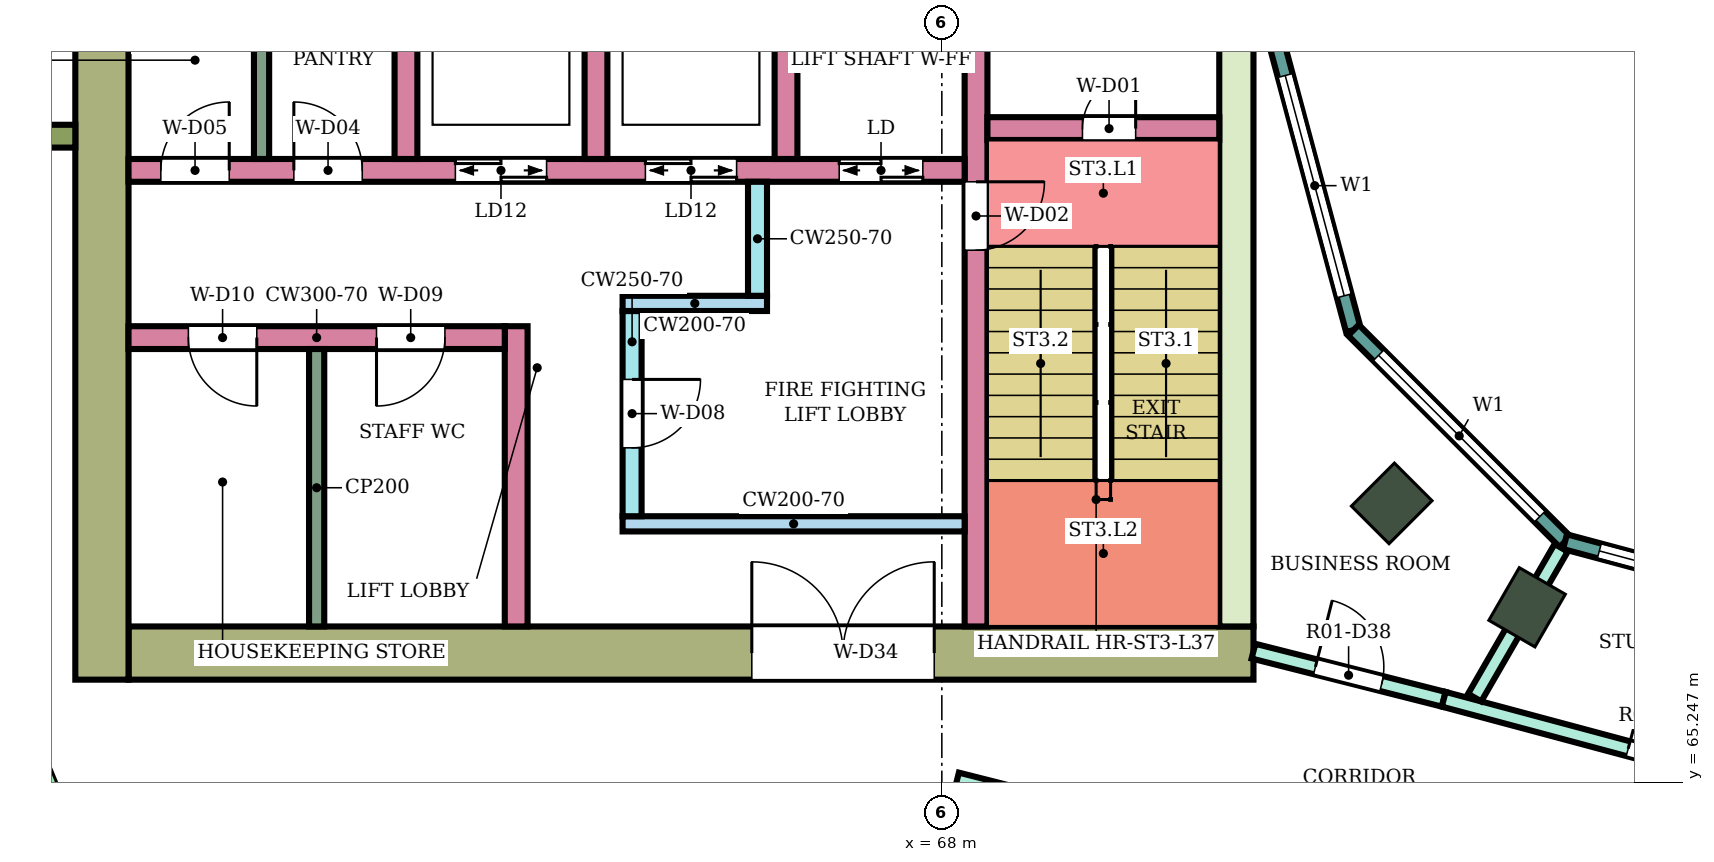
"""IFC4 building model, lengths in metres.
Left out: names, types, materials, properties, quantities, classifications, styles, units other than length and angle.
Written with IfcOpenShell. Run it as: python <this file> out.ifc"""

import sys

from ifc_helpers import new_model, si_unit, direction, frame, frame_2d, origin, origin_2d, place, context, subcontext, project, spatial, rectangle, extrude, element, fill, save


model = new_model("IFC4")
c1 = context("Model", 3, precision=1e-05, world=origin(), true_north=direction((0.0, 1.0)))
c2 = subcontext(c1, "Body", "Model", "MODEL_VIEW")
j1 = project(units=[si_unit("LENGTHUNIT", "METRE"), si_unit("PLANEANGLEUNIT", "RADIAN")], contexts=[c1])
p1 = place(None, origin())
s1 = spatial("IfcSite", under=j1, at=p1, CompositionType="ELEMENT")
p2 = place(p1, origin())
s2 = spatial("IfcBuilding", under=s1, at=p2, CompositionType="ELEMENT")
p3 = place(p2, frame((0.0, 0.0, 161.8)))
s3 = spatial("IfcBuildingStorey", under=s2, at=p3, CompositionType="ELEMENT", Elevation=161.8)
for number, where, z_axis, x_axis in (
    (1, (73.919, 68.919, 0.0), (0.0, 0.0, 1.0), (-0.707, -0.707, 0.0)),
    (2, (75.7, 67.552, 0.0), (0.0, 0.0, 1.0), (-0.5, -0.866, 0.0)),
):
    element("IfcColumn", number, at=place(p3, frame(where, z_axis=z_axis, x_axis=x_axis)), inside=s3, PredefinedType="COLUMN", context=c2, shape_type="SweptSolid", body=[
        extrude(rectangle(XDim=0.8, YDim=0.7, at=origin_2d()), origin(), (0.0, 0.0, 1.0), 4.1),
    ])
p4 = place(p3, frame((72.1, 66.95, 0.0), z_axis=(0.0, 0.0, 1.0), x_axis=(-1.0, 0.0, 0.0)))
e3 = element("IfcWall", 3, at=p4, inside=s3, PredefinedType="SHEAR", context=c2, shape_type="SweptSolid", body=[
    extrude(rectangle(XDim=14.8, YDim=0.7, at=frame_2d((7.4, 0.0))), origin(), (0.0, 0.0, 1.0), 3.78),
])
p5 = place(p4, frame((4.2, 0.0, 0.0)))
e4 = element("IfcOpeningElement", 4, at=p5, cuts=e3, PredefinedType="OPENING", context=c2, shape_type="SweptSolid", body=[
    extrude(rectangle(XDim=2.4, YDim=2.4, at=frame_2d((1.2, 1.2))), frame((0.0, 0.36, 0.0), z_axis=(0.0, -1.0, 0.0), x_axis=(1.0, 0.0, 0.0)), (0.0, 0.0, 1.0), 0.72),
])
p6 = place(p3, frame((71.875, 75.0, 0.0), z_axis=(0.0, 0.0, 1.0), x_axis=(0.0, -1.0, 0.0)))
e5 = element("IfcWall", 5, at=p6, inside=s3, PredefinedType="SHEAR", context=c2, shape_type="SweptSolid", body=[
    extrude(rectangle(XDim=7.7, YDim=0.45, at=frame_2d((3.85, 0.0))), origin(), (0.0, 0.0, 1.0), 3.78),
])
p7 = place(p3, frame((56.95, 83.4, 0.0), z_axis=(0.0, 0.0, 1.0), x_axis=(0.0, -1.0, 0.0)))
e6 = element("IfcWall", 6, at=p7, inside=s3, PredefinedType="SHEAR", context=c2, shape_type="SweptSolid", body=[
    extrude(rectangle(XDim=16.8, YDim=0.7, at=frame_2d((8.4, 0.0))), origin(), (0.0, 0.0, 1.0), 3.78),
])
p8 = place(p3, frame((68.45, 75.0, 0.0), z_axis=(0.0, 0.0, 1.0), x_axis=(0.0, -1.0, 0.0)))
e7 = element("IfcWall", 7, at=p8, inside=s3, PredefinedType="SHEAR", context=c2, shape_type="SweptSolid", body=[
    extrude(rectangle(XDim=7.7, YDim=0.3, at=frame_2d((3.85, 0.0))), origin(), (0.0, 0.0, 1.0), 3.78),
])
p9 = place(p8, frame((1.85, 0.0, 0.0)))
e8 = element("IfcOpeningElement", 8, at=p9, cuts=e7, PredefinedType="OPENING", context=c2, shape_type="SweptSolid", body=[
    extrude(rectangle(XDim=0.9, YDim=2.1, at=frame_2d((0.45, 1.05))), frame((0.0, 0.16, 0.0), z_axis=(0.0, -1.0, 0.0), x_axis=(1.0, 0.0, 0.0)), (0.0, 0.0, 1.0), 0.32),
])
p10 = place(p3, frame((71.65, 73.85, 0.0), z_axis=(0.0, 0.0, 1.0), x_axis=(-1.0, 0.0, 0.0)))
e9 = element("IfcWall", 9, at=p10, inside=s3, PredefinedType="SHEAR", context=c2, shape_type="SweptSolid", body=[
    extrude(rectangle(XDim=3.05, YDim=0.3, at=frame_2d((1.525, 0.0))), origin(), (0.0, 0.0, 1.0), 3.78),
])
p11 = place(p10, frame((1.1, 0.0, 0.0)))
e10 = element("IfcOpeningElement", 10, at=p11, cuts=e9, PredefinedType="OPENING", context=c2, shape_type="SweptSolid", body=[
    extrude(rectangle(XDim=0.7, YDim=2.0, at=frame_2d((0.35, 1.0))), frame((0.0, 0.16, 0.0), z_axis=(0.0, -1.0, 0.0), x_axis=(1.0, 0.0, 0.0)), (0.0, 0.0, 1.0), 0.32),
])
p12 = place(p3, frame((68.3, 73.3, 0.0), z_axis=(0.0, 0.0, 1.0), x_axis=(-1.0, 0.0, 0.0)))
e11 = element("IfcWall", 11, at=p12, inside=s3, PredefinedType="SHEAR", context=c2, shape_type="SweptSolid", body=[
    extrude(rectangle(XDim=11.0, YDim=0.3, at=frame_2d((5.5, 0.0))), origin(), (0.0, 0.0, 1.0), 3.78),
])
p13 = place(p12, frame((0.55, 0.0, 0.0)))
e12 = element("IfcOpeningElement", 12, at=p13, cuts=e11, PredefinedType="OPENING", context=c2, shape_type="SweptSolid", body=[
    extrude(rectangle(XDim=1.1, YDim=2.1, at=frame_2d((0.55, 1.05))), frame((0.0, 0.16, 0.0), z_axis=(0.0, -1.0, 0.0), x_axis=(1.0, 0.0, 0.0)), (0.0, 0.0, 1.0), 0.32),
])
p14 = place(p12, frame((3.0, 0.0, 0.0)))
e13 = element("IfcOpeningElement", 13, at=p14, cuts=e11, PredefinedType="OPENING", context=c2, shape_type="SweptSolid", body=[
    extrude(rectangle(XDim=1.2, YDim=2.1, at=frame_2d((0.6, 1.05))), frame((0.0, 0.16, 0.0), z_axis=(0.0, -1.0, 0.0), x_axis=(1.0, 0.0, 0.0)), (0.0, 0.0, 1.0), 0.32),
])
p15 = place(p12, frame((5.5, 0.0, 0.0)))
e14 = element("IfcOpeningElement", 14, at=p15, cuts=e11, PredefinedType="OPENING", context=c2, shape_type="SweptSolid", body=[
    extrude(rectangle(XDim=1.2, YDim=2.1, at=frame_2d((0.6, 1.05))), frame((0.0, 0.16, 0.0), z_axis=(0.0, -1.0, 0.0), x_axis=(1.0, 0.0, 0.0)), (0.0, 0.0, 1.0), 0.32),
])
p16 = place(p12, frame((7.925, 0.0, 0.0)))
e15 = element("IfcOpeningElement", 15, at=p16, cuts=e11, PredefinedType="OPENING", context=c2, shape_type="SweptSolid", body=[
    extrude(rectangle(XDim=0.9, YDim=2.1, at=frame_2d((0.45, 1.05))), frame((0.0, 0.16, 0.0), z_axis=(0.0, -1.0, 0.0), x_axis=(1.0, 0.0, 0.0)), (0.0, 0.0, 1.0), 0.32),
])
p17 = place(p12, frame((9.675, 0.0, 0.0)))
e16 = element("IfcOpeningElement", 16, at=p17, cuts=e11, PredefinedType="OPENING", context=c2, shape_type="SweptSolid", body=[
    extrude(rectangle(XDim=0.9, YDim=2.1, at=frame_2d((0.45, 1.05))), frame((0.0, 0.16, 0.0), z_axis=(0.0, -1.0, 0.0), x_axis=(1.0, 0.0, 0.0)), (0.0, 0.0, 1.0), 0.32),
])
for number, where, z_axis, x_axis in (
    (17, (65.95, 76.0, 0.0), (0.0, 0.0, 1.0), (0.0, -1.0, 0.0)),
    (18, (63.45, 76.0, 0.0), (0.0, 0.0, 1.0), (0.0, -1.0, 0.0)),
    (19, (60.95, 76.0, 0.0), (0.0, 0.0, 1.0), (0.0, -1.0, 0.0)),
):
    element("IfcWall", number, at=place(p3, frame(where, z_axis=z_axis, x_axis=x_axis)), inside=s3, PredefinedType="SHEAR", context=c2, shape_type="SweptSolid", body=[
        extrude(rectangle(XDim=2.55, YDim=0.3, at=frame_2d((1.275, 0.0))), origin(), (0.0, 0.0, 1.0), 3.78),
    ])
p18 = place(p3, frame((68.3, 68.65, 0.0), z_axis=(0.0, 0.0, 1.0), x_axis=(-1.0, 0.0, 0.0)))
e20 = element("IfcWall", 20, at=p18, inside=s3, PredefinedType="SHEAR", context=c2, shape_type="SweptSolid", body=[
    extrude(rectangle(XDim=4.5, YDim=0.2, at=frame_2d((2.25, 0.0))), origin(), (0.0, 0.0, 1.0), 3.78),
])
p19 = place(p3, frame((63.925, 71.45, 0.0), z_axis=(0.0, 0.0, 1.0), x_axis=(0.0, -1.0, 0.0)))
e21 = element("IfcWall", 21, at=p19, inside=s3, PredefinedType="SHEAR", context=c2, shape_type="SweptSolid", body=[
    extrude(rectangle(XDim=2.7, YDim=0.25, at=frame_2d((1.35, 0.0))), origin(), (0.0, 0.0, 1.0), 3.78),
])
p20 = place(p19, frame((0.9, 0.0, 0.0)))
e22 = element("IfcOpeningElement", 22, at=p20, cuts=e21, PredefinedType="OPENING", context=c2, shape_type="SweptSolid", body=[
    extrude(rectangle(XDim=0.9, YDim=2.1, at=frame_2d((0.45, 1.05))), frame((0.0, 0.135, 0.0), z_axis=(0.0, -1.0, 0.0), x_axis=(1.0, 0.0, 0.0)), (0.0, 0.0, 1.0), 0.27),
])
p21 = place(p3, frame((65.7, 71.55, 0.0), z_axis=(0.0, 0.0, 1.0), x_axis=(-1.0, 0.0, 0.0)))
e23 = element("IfcWall", 23, at=p21, inside=s3, PredefinedType="SHEAR", context=c2, shape_type="SweptSolid", body=[
    extrude(rectangle(XDim=1.9, YDim=0.2, at=frame_2d((0.95, 0.0))), origin(), (0.0, 0.0, 1.0), 3.78),
])
p22 = place(p3, frame((65.575, 73.15, 0.0), z_axis=(0.0, 0.0, 1.0), x_axis=(0.0, -1.0, 0.0)))
e24 = element("IfcWall", 24, at=p22, inside=s3, PredefinedType="SHEAR", context=c2, shape_type="SweptSolid", body=[
    extrude(rectangle(XDim=1.5, YDim=0.25, at=frame_2d((0.75, 0.0))), origin(), (0.0, 0.0, 1.0), 3.78),
])
p23 = place(p3, frame((62.4, 71.25, 0.0), z_axis=(0.0, 0.0, 1.0), x_axis=(0.0, -1.0, 0.0)))
e25 = element("IfcWall", 25, at=p23, inside=s3, PredefinedType="SHEAR", context=c2, shape_type="SweptSolid", body=[
    extrude(rectangle(XDim=3.95, YDim=0.3, at=frame_2d((1.975, 0.0))), origin(), (0.0, 0.0, 1.0), 3.78),
])
p24 = place(p3, frame((62.25, 71.1, 0.0), z_axis=(0.0, 0.0, 1.0), x_axis=(-1.0, 0.0, 0.0)))
e26 = element("IfcWall", 26, at=p24, inside=s3, PredefinedType="SHEAR", context=c2, shape_type="SweptSolid", body=[
    extrude(rectangle(XDim=4.95, YDim=0.3, at=frame_2d((2.475, 0.0))), origin(), (0.0, 0.0, 1.0), 3.78),
])
p25 = place(p24, frame((0.788, 0.0, 0.0)))
e27 = element("IfcOpeningElement", 27, at=p25, cuts=e26, PredefinedType="OPENING", context=c2, shape_type="SweptSolid", body=[
    extrude(rectangle(XDim=0.9, YDim=2.1, at=frame_2d((0.45, 1.05))), frame((0.0, 0.16, 0.0), z_axis=(0.0, -1.0, 0.0), x_axis=(1.0, 0.0, 0.0)), (0.0, 0.0, 1.0), 0.32),
])
p26 = place(p24, frame((3.262, 0.0, 0.0)))
e28 = element("IfcOpeningElement", 28, at=p26, cuts=e26, PredefinedType="OPENING", context=c2, shape_type="SweptSolid", body=[
    extrude(rectangle(XDim=0.9, YDim=2.1, at=frame_2d((0.45, 1.05))), frame((0.0, 0.16, 0.0), z_axis=(0.0, -1.0, 0.0), x_axis=(1.0, 0.0, 0.0)), (0.0, 0.0, 1.0), 0.32),
])
p27 = place(p3, frame((56.6, 73.75, 0.0), z_axis=(0.0, 0.0, 1.0), x_axis=(-1.0, 0.0, 0.0)))
e29 = element("IfcWall", 29, at=p27, inside=s3, PredefinedType="NOTDEFINED", context=c2, shape_type="SweptSolid", body=[
    extrude(rectangle(XDim=2.416, YDim=0.3, at=frame_2d((1.208, 0.0))), origin(), (0.0, 0.0, 1.0), 4.1),
])
p28 = place(p3, frame((72.396, 75.0, 0.0), z_axis=(0.0, 0.0, 1.0), x_axis=(0.258789828301, -0.965933654434, 0.0)))
e30 = element("IfcWall", 30, at=p28, inside=s3, PredefinedType="NOTDEFINED", context=c2, shape_type="SweptSolid", body=[
    extrude(rectangle(XDim=3.936, YDim=0.2, at=frame_2d((1.968, 0.0))), origin(), (0.0, 0.0, 1.0), 4.1),
])
p29 = place(p28, frame((0.468, 0.0, 0.9)))
e31 = element("IfcOpeningElement", 31, at=p29, cuts=e30, PredefinedType="OPENING", context=c2, shape_type="SweptSolid", body=[
    extrude(rectangle(XDim=3.0, YDim=2.3, at=frame_2d((1.5, 1.15))), frame((0.0, 0.11, 0.0), z_axis=(0.0, -1.0, 0.0), x_axis=(1.0, 0.0, 0.0)), (0.0, 0.0, 1.0), 0.22),
])
p30 = place(p3, frame((73.415, 71.198, 0.0), z_axis=(0.0, 0.0, 1.0), x_axis=(0.707106781187, -0.707106781187, 0.0)))
e32 = element("IfcWall", 32, at=p30, inside=s3, PredefinedType="NOTDEFINED", context=c2, shape_type="SweptSolid", body=[
    extrude(rectangle(XDim=3.936, YDim=0.2, at=frame_2d((1.968, 0.0))), origin(), (0.0, 0.0, 1.0), 4.1),
])
p31 = place(p30, frame((0.468, 0.0, 0.9)))
e33 = element("IfcOpeningElement", 33, at=p31, cuts=e32, PredefinedType="OPENING", context=c2, shape_type="SweptSolid", body=[
    extrude(rectangle(XDim=3.0, YDim=2.3, at=frame_2d((1.5, 1.15))), frame((0.0, 0.11, 0.0), z_axis=(0.0, -1.0, 0.0), x_axis=(1.0, 0.0, 0.0)), (0.0, 0.0, 1.0), 0.22),
])
p32 = place(p3, frame((76.198, 68.415, 0.0), z_axis=(0.0, 0.0, 1.0), x_axis=(0.965933654434, -0.258789828301, 0.0)))
e34 = element("IfcWall", 34, at=p32, inside=s3, PredefinedType="NOTDEFINED", context=c2, shape_type="SweptSolid", body=[
    extrude(rectangle(XDim=3.936, YDim=0.2, at=frame_2d((1.968, 0.0))), origin(), (0.0, 0.0, 1.0), 4.1),
])
p33 = place(p32, frame((0.468, 0.0, 0.9)))
e35 = element("IfcOpeningElement", 35, at=p33, cuts=e34, PredefinedType="OPENING", context=c2, shape_type="SweptSolid", body=[
    extrude(rectangle(XDim=3.0, YDim=2.3, at=frame_2d((1.5, 1.15))), frame((0.0, 0.11, 0.0), z_axis=(0.0, -1.0, 0.0), x_axis=(1.0, 0.0, 0.0)), (0.0, 0.0, 1.0), 0.22),
])
p34 = place(p3, frame((68.2, 65.28, 0.0), z_axis=(0.0, 0.0, 1.0), x_axis=(0.969450596516, -0.245286650503, 0.0)))
e36 = element("IfcWall", 36, at=p34, inside=s3, PredefinedType="PARTITIONING", context=c2, shape_type="SweptSolid", body=[
    extrude(rectangle(XDim=5.928, YDim=0.2, at=frame_2d((2.964, 0.0))), origin(), (0.0, 0.0, 1.0), 3.65),
])
p35 = place(p3, frame((72.1, 66.975, 0.0), z_axis=(0.0, 0.0, 1.0), x_axis=(0.969471314457, -0.245204752086, 0.0)))
e37 = element("IfcWall", 37, at=p35, inside=s3, PredefinedType="PARTITIONING", context=c2, shape_type="SweptSolid", body=[
    extrude(rectangle(XDim=2.582, YDim=0.2, at=frame_2d((1.291, 0.0))), origin(), (0.0, 0.0, 1.0), 3.65),
])
p36 = place(p35, frame((0.841, 0.0, 0.0)))
e38 = element("IfcOpeningElement", 38, at=p36, cuts=e37, PredefinedType="OPENING", context=c2, shape_type="SweptSolid", body=[
    extrude(rectangle(XDim=0.9, YDim=2.1, at=frame_2d((0.45, 1.05))), frame((0.0, 0.11, 0.0), z_axis=(0.0, -1.0, 0.0), x_axis=(1.0, 0.0, 0.0)), (0.0, 0.0, 1.0), 0.22),
])
p37 = place(p3, frame((74.603, 66.342, 0.0), z_axis=(0.0, 0.0, 1.0), x_axis=(0.965920893652, -0.258837453254, 0.0)))
e39 = element("IfcWall", 39, at=p37, inside=s3, PredefinedType="PARTITIONING", context=c2, shape_type="SweptSolid", body=[
    extrude(rectangle(XDim=5.458, YDim=0.2, at=frame_2d((2.729, 0.0))), origin(), (0.0, 0.0, 1.0), 3.65),
])
p38 = place(p37, frame((2.512, 0.0, 0.0)))
e40 = element("IfcOpeningElement", 40, at=p38, cuts=e39, PredefinedType="OPENING", context=c2, shape_type="SweptSolid", body=[
    extrude(rectangle(XDim=0.9, YDim=2.1, at=frame_2d((0.45, 1.05))), frame((0.0, 0.11, 0.0), z_axis=(0.0, -1.0, 0.0), x_axis=(1.0, 0.0, 0.0)), (0.0, 0.0, 1.0), 0.22),
])
p39 = place(p3, frame((75.01, 66.364, 0.0), z_axis=(0.0, 0.0, 1.0), x_axis=(0.50017749597, 0.865922902183, 0.0)))
e41 = element("IfcWall", 41, at=p39, inside=s3, PredefinedType="PARTITIONING", context=c2, shape_type="SweptSolid", body=[
    extrude(rectangle(XDim=2.276, YDim=0.2, at=frame_2d((1.138, 0.0))), origin(), (0.0, 0.0, 1.0), 3.65),
])
p40 = place(p3, frame((59.05, 76.0, 0.0), z_axis=(0.0, 0.0, 1.0), x_axis=(0.0, -1.0, 0.0)))
e42 = element("IfcWall", 42, at=p40, inside=s3, PredefinedType="PARTITIONING", context=c2, shape_type="SweptSolid", body=[
    extrude(rectangle(XDim=2.55, YDim=0.2, at=frame_2d((1.275, 0.0))), origin(), (0.0, 0.0, 1.0), 3.78),
])
p41 = place(p3, frame((59.775, 70.95, 0.0), z_axis=(0.0, 0.0, 1.0), x_axis=(0.0, -1.0, 0.0)))
e43 = element("IfcWall", 43, at=p41, inside=s3, PredefinedType="PARTITIONING", context=c2, shape_type="SweptSolid", body=[
    extrude(rectangle(XDim=3.65, YDim=0.2, at=frame_2d((1.825, 0.0))), origin(), (0.0, 0.0, 1.0), 3.78),
])
p42 = place(p29, origin())
e44 = element("IfcWindow", 44, at=p42, inside=s3, PartitioningType="SINGLE_PANEL", PredefinedType="WINDOW", context=c2, shape_type="SweptSolid", body=[
    extrude(rectangle(XDim=3.0, YDim=2.3, at=frame_2d((1.5, 1.15))), frame((0.0, 0.03, 0.0), z_axis=(0.0, -1.0, 0.0), x_axis=(1.0, 0.0, 0.0)), (0.0, 0.0, 1.0), 0.06),
])
fill(e31, e44)
p43 = place(p31, origin())
e45 = element("IfcWindow", 45, at=p43, inside=s3, PartitioningType="SINGLE_PANEL", PredefinedType="WINDOW", context=c2, shape_type="SweptSolid", body=[
    extrude(rectangle(XDim=3.0, YDim=2.3, at=frame_2d((1.5, 1.15))), frame((0.0, 0.03, 0.0), z_axis=(0.0, -1.0, 0.0), x_axis=(1.0, 0.0, 0.0)), (0.0, 0.0, 1.0), 0.06),
])
fill(e33, e45)
p44 = place(p33, origin())
e46 = element("IfcWindow", 46, at=p44, inside=s3, PartitioningType="SINGLE_PANEL", PredefinedType="WINDOW", context=c2, shape_type="SweptSolid", body=[
    extrude(rectangle(XDim=3.0, YDim=2.3, at=frame_2d((1.5, 1.15))), frame((0.0, 0.03, 0.0), z_axis=(0.0, -1.0, 0.0), x_axis=(1.0, 0.0, 0.0)), (0.0, 0.0, 1.0), 0.06),
])
fill(e35, e46)
p45 = place(p38, origin())
e47 = element("IfcDoor", 47, at=p45, inside=s3, OperationType="SINGLE_SWING_LEFT", PredefinedType="DOOR", context=c2, shape_type="SweptSolid", body=[
    extrude(rectangle(XDim=0.9, YDim=2.1, at=frame_2d((0.45, 1.05))), frame((0.0, 0.025, 0.0), z_axis=(0.0, -1.0, 0.0), x_axis=(1.0, 0.0, 0.0)), (0.0, 0.0, 1.0), 0.05),
])
fill(e40, e47)
p46 = place(p36, origin())
e48 = element("IfcDoor", 48, at=p46, inside=s3, OperationType="SINGLE_SWING_LEFT", PredefinedType="DOOR", context=c2, shape_type="SweptSolid", body=[
    extrude(rectangle(XDim=0.9, YDim=2.1, at=frame_2d((0.45, 1.05))), frame((0.0, 0.025, 0.0), z_axis=(0.0, -1.0, 0.0), x_axis=(1.0, 0.0, 0.0)), (0.0, 0.0, 1.0), 0.05),
])
fill(e38, e48)
p47 = place(p11, frame((0.7, 0.0, 0.0), z_axis=(0.0, 0.0, 1.0), x_axis=(-1.0, 0.0, 0.0)))
e49 = element("IfcDoor", 49, at=p47, inside=s3, OperationType="SINGLE_SWING_RIGHT", PredefinedType="DOOR", context=c2, shape_type="SweptSolid", body=[
    extrude(rectangle(XDim=0.7, YDim=2.0, at=frame_2d((0.35, 1.0))), frame((0.0, 0.025, 0.0), z_axis=(0.0, -1.0, 0.0), x_axis=(1.0, 0.0, 0.0)), (0.0, 0.0, 1.0), 0.05),
])
fill(e10, e49)
p48 = place(p9, origin())
e50 = element("IfcDoor", 50, at=p48, inside=s3, OperationType="SINGLE_SWING_LEFT", PredefinedType="DOOR", context=c2, shape_type="SweptSolid", body=[
    extrude(rectangle(XDim=0.9, YDim=2.1, at=frame_2d((0.45, 1.05))), frame((0.0, 0.025, 0.0), z_axis=(0.0, -1.0, 0.0), x_axis=(1.0, 0.0, 0.0)), (0.0, 0.0, 1.0), 0.05),
])
fill(e8, e50)
p49 = place(p13, origin())
e51 = element("IfcDoor", 51, at=p49, inside=s3, OperationType="DOUBLE_DOOR_SLIDING", PredefinedType="DOOR", context=c2, shape_type="SweptSolid", body=[
    extrude(rectangle(XDim=1.1, YDim=2.1, at=frame_2d((0.55, 1.05))), frame((0.0, 0.025, 0.0), z_axis=(0.0, -1.0, 0.0), x_axis=(1.0, 0.0, 0.0)), (0.0, 0.0, 1.0), 0.05),
])
fill(e12, e51)
p50 = place(p14, origin())
e52 = element("IfcDoor", 52, at=p50, inside=s3, OperationType="DOUBLE_DOOR_SLIDING", PredefinedType="DOOR", context=c2, shape_type="SweptSolid", body=[
    extrude(rectangle(XDim=1.2, YDim=2.1, at=frame_2d((0.6, 1.05))), frame((0.0, 0.025, 0.0), z_axis=(0.0, -1.0, 0.0), x_axis=(1.0, 0.0, 0.0)), (0.0, 0.0, 1.0), 0.05),
])
fill(e13, e52)
p51 = place(p15, origin())
e53 = element("IfcDoor", 53, at=p51, inside=s3, OperationType="DOUBLE_DOOR_SLIDING", PredefinedType="DOOR", context=c2, shape_type="SweptSolid", body=[
    extrude(rectangle(XDim=1.2, YDim=2.1, at=frame_2d((0.6, 1.05))), frame((0.0, 0.025, 0.0), z_axis=(0.0, -1.0, 0.0), x_axis=(1.0, 0.0, 0.0)), (0.0, 0.0, 1.0), 0.05),
])
fill(e14, e53)
p52 = place(p16, frame((0.9, 0.0, 0.0), z_axis=(0.0, 0.0, 1.0), x_axis=(-1.0, 0.0, 0.0)))
e54 = element("IfcDoor", 54, at=p52, inside=s3, OperationType="SINGLE_SWING_LEFT", PredefinedType="DOOR", context=c2, shape_type="SweptSolid", body=[
    extrude(rectangle(XDim=0.9, YDim=2.1, at=frame_2d((0.45, 1.05))), frame((0.0, 0.025, 0.0), z_axis=(0.0, -1.0, 0.0), x_axis=(1.0, 0.0, 0.0)), (0.0, 0.0, 1.0), 0.05),
])
fill(e15, e54)
p53 = place(p17, frame((0.9, 0.0, 0.0), z_axis=(0.0, 0.0, 1.0), x_axis=(-1.0, 0.0, 0.0)))
e55 = element("IfcDoor", 55, at=p53, inside=s3, OperationType="SINGLE_SWING_RIGHT", PredefinedType="DOOR", context=c2, shape_type="SweptSolid", body=[
    extrude(rectangle(XDim=0.9, YDim=2.1, at=frame_2d((0.45, 1.05))), frame((0.0, 0.025, 0.0), z_axis=(0.0, -1.0, 0.0), x_axis=(1.0, 0.0, 0.0)), (0.0, 0.0, 1.0), 0.05),
])
fill(e16, e55)
p54 = place(p20, origin())
e56 = element("IfcDoor", 56, at=p54, inside=s3, OperationType="SINGLE_SWING_LEFT", PredefinedType="DOOR", context=c2, shape_type="SweptSolid", body=[
    extrude(rectangle(XDim=0.9, YDim=2.1, at=frame_2d((0.45, 1.05))), frame((0.0, 0.025, 0.0), z_axis=(0.0, -1.0, 0.0), x_axis=(1.0, 0.0, 0.0)), (0.0, 0.0, 1.0), 0.05),
])
fill(e22, e56)
p55 = place(p25, origin())
e57 = element("IfcDoor", 57, at=p55, inside=s3, OperationType="SINGLE_SWING_RIGHT", PredefinedType="DOOR", context=c2, shape_type="SweptSolid", body=[
    extrude(rectangle(XDim=0.9, YDim=2.1, at=frame_2d((0.45, 1.05))), frame((0.0, 0.025, 0.0), z_axis=(0.0, -1.0, 0.0), x_axis=(1.0, 0.0, 0.0)), (0.0, 0.0, 1.0), 0.05),
])
fill(e27, e57)
p56 = place(p26, origin())
e58 = element("IfcDoor", 58, at=p56, inside=s3, OperationType="SINGLE_SWING_LEFT", PredefinedType="DOOR", context=c2, shape_type="SweptSolid", body=[
    extrude(rectangle(XDim=0.9, YDim=2.1, at=frame_2d((0.45, 1.05))), frame((0.0, 0.025, 0.0), z_axis=(0.0, -1.0, 0.0), x_axis=(1.0, 0.0, 0.0)), (0.0, 0.0, 1.0), 0.05),
])
fill(e28, e58)
p57 = place(p5, frame((2.4, 0.0, 0.0), z_axis=(0.0, 0.0, 1.0), x_axis=(-1.0, 0.0, 0.0)))
e59 = element("IfcDoor", 59, at=p57, inside=s3, OperationType="DOUBLE_DOOR_SINGLE_SWING", PredefinedType="DOOR", context=c2, shape_type="SweptSolid", body=[
    extrude(rectangle(XDim=2.4, YDim=2.4, at=frame_2d((1.2, 1.2))), frame((0.0, 0.025, 0.0), z_axis=(0.0, -1.0, 0.0), x_axis=(1.0, 0.0, 0.0)), (0.0, 0.0, 1.0), 0.05),
])
fill(e4, e59)
save(model, sys.argv[1])
